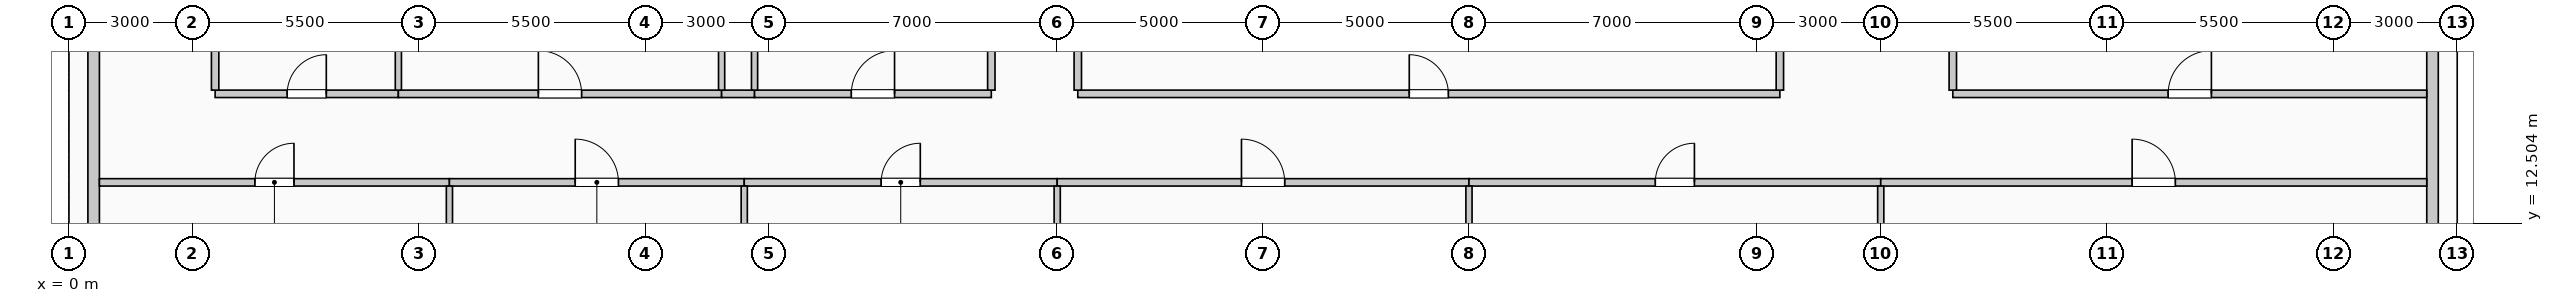
"""IFC4 building model, lengths in metres.
Left out: names, types, materials, properties, quantities, classifications, styles, units other than length and angle.
Written with IfcOpenShell. Run it as: python <this file> out.ifc"""

import sys

from ifc_helpers import new_model, si_unit, direction, frame, frame_2d, origin, place, context, subcontext, project, spatial, rectangle, extrude, element, fill, save


model = new_model("IFC4")
c1 = context("Model", 3, precision=1e-05, world=origin(), true_north=direction((0.0, 1.0)))
c2 = subcontext(c1, "Body", "Model", "MODEL_VIEW")
j1 = project(units=[si_unit("LENGTHUNIT", "METRE"), si_unit("PLANEANGLEUNIT", "RADIAN")], contexts=[c1])
p1 = place(None, origin())
s1 = spatial("IfcSite", under=j1, at=p1, CompositionType="ELEMENT")
p2 = place(p1, origin())
s2 = spatial("IfcBuilding", under=s1, at=p2, CompositionType="ELEMENT")
p3 = place(p2, frame((0.0, 0.0, 140.6)))
s3 = spatial("IfcBuildingStorey", under=s2, at=p3, CompositionType="ELEMENT", Elevation=140.6)
for number, where, z_axis, x_axis in (
    (1, (0.6, 10.445, 0.0), (0.0, 0.0, 1.0), (0.0, 1.0, 0.0)),
    (2, (57.4, 17.555, 0.0), (0.0, 0.0, 1.0), (0.0, -1.0, 0.0)),
):
    element("IfcWall", number, at=place(p3, frame(where, z_axis=z_axis, x_axis=x_axis)), inside=s3, PredefinedType="SOLIDWALL", context=c2, shape_type="SweptSolid", body=[
        extrude(rectangle(XDim=7.11, YDim=0.28, at=frame_2d((3.555, 0.0))), origin(), (0.0, 0.0, 1.0), 2.875),
    ])
p4 = place(p3, frame((0.74, 13.5, 0.0), z_axis=(0.0, 0.0, 1.0), x_axis=(1.0, 0.0, 0.0)))
e3 = element("IfcWall", 3, at=p4, inside=s3, PredefinedType="PARTITIONING", context=c2, shape_type="SweptSolid", body=[
    extrude(rectangle(XDim=8.5, YDim=0.18, at=frame_2d((4.25, 0.0))), origin(), (0.0, 0.0, 1.0), 3.725),
])
p5 = place(p4, frame((3.775, 0.0, 0.0)))
e4 = element("IfcOpeningElement", 4, at=p5, cuts=e3, PredefinedType="OPENING", context=c2, shape_type="SweptSolid", body=[
    extrude(rectangle(XDim=0.95, YDim=2.15, at=frame_2d((0.475, 1.075))), frame((0.0, 0.1, 0.0), z_axis=(0.0, -1.0, 0.0), x_axis=(1.0, 0.0, 0.0)), (0.0, 0.0, 1.0), 0.2),
])
p6 = place(p3, frame((9.24, 13.5, 0.0), z_axis=(0.0, 0.0, 1.0), x_axis=(1.0, 0.0, 0.0)))
e5 = element("IfcWall", 5, at=p6, inside=s3, PredefinedType="PARTITIONING", context=c2, shape_type="SweptSolid", body=[
    extrude(rectangle(XDim=7.16, YDim=0.18, at=frame_2d((3.58, 0.0))), origin(), (0.0, 0.0, 1.0), 3.725),
])
p7 = place(p6, frame((3.055, 0.0, 0.0)))
e6 = element("IfcOpeningElement", 6, at=p7, cuts=e5, PredefinedType="OPENING", context=c2, shape_type="SweptSolid", body=[
    extrude(rectangle(XDim=1.05, YDim=2.15, at=frame_2d((0.525, 1.075))), frame((0.0, 0.1, 0.0), z_axis=(0.0, -1.0, 0.0), x_axis=(1.0, 0.0, 0.0)), (0.0, 0.0, 1.0), 0.2),
])
p8 = place(p3, frame((16.4, 13.5, 0.0), z_axis=(0.0, 0.0, 1.0), x_axis=(1.0, 0.0, 0.0)))
e7 = element("IfcWall", 7, at=p8, inside=s3, PredefinedType="PARTITIONING", context=c2, shape_type="SweptSolid", body=[
    extrude(rectangle(XDim=7.6, YDim=0.18, at=frame_2d((3.8, 0.0))), origin(), (0.0, 0.0, 1.0), 3.725),
])
p9 = place(p8, frame((3.325, 0.0, 0.0)))
e8 = element("IfcOpeningElement", 8, at=p9, cuts=e7, PredefinedType="OPENING", context=c2, shape_type="SweptSolid", body=[
    extrude(rectangle(XDim=0.95, YDim=2.15, at=frame_2d((0.475, 1.075))), frame((0.0, 0.1, 0.0), z_axis=(0.0, -1.0, 0.0), x_axis=(1.0, 0.0, 0.0)), (0.0, 0.0, 1.0), 0.2),
])
p10 = place(p3, frame((24.0, 13.5, 0.0), z_axis=(0.0, 0.0, 1.0), x_axis=(1.0, 0.0, 0.0)))
e9 = element("IfcWall", 9, at=p10, inside=s3, PredefinedType="PARTITIONING", context=c2, shape_type="SweptSolid", body=[
    extrude(rectangle(XDim=10.0, YDim=0.18, at=frame_2d((5.0, 0.0))), origin(), (0.0, 0.0, 1.0), 3.725),
])
p11 = place(p10, frame((4.475, 0.0, 0.0)))
e10 = element("IfcOpeningElement", 10, at=p11, cuts=e9, PredefinedType="OPENING", context=c2, shape_type="SweptSolid", body=[
    extrude(rectangle(XDim=1.05, YDim=2.15, at=frame_2d((0.525, 1.075))), frame((0.0, 0.1, 0.0), z_axis=(0.0, -1.0, 0.0), x_axis=(1.0, 0.0, 0.0)), (0.0, 0.0, 1.0), 0.2),
])
p12 = place(p3, frame((34.0, 13.5, 0.0), z_axis=(0.0, 0.0, 1.0), x_axis=(1.0, 0.0, 0.0)))
e11 = element("IfcWall", 11, at=p12, inside=s3, PredefinedType="PARTITIONING", context=c2, shape_type="SweptSolid", body=[
    extrude(rectangle(XDim=10.0, YDim=0.18, at=frame_2d((5.0, 0.0))), origin(), (0.0, 0.0, 1.0), 3.725),
])
p13 = place(p12, frame((4.525, 0.0, 0.0)))
e12 = element("IfcOpeningElement", 12, at=p13, cuts=e11, PredefinedType="OPENING", context=c2, shape_type="SweptSolid", body=[
    extrude(rectangle(XDim=0.95, YDim=2.15, at=frame_2d((0.475, 1.075))), frame((0.0, 0.1, 0.0), z_axis=(0.0, -1.0, 0.0), x_axis=(1.0, 0.0, 0.0)), (0.0, 0.0, 1.0), 0.2),
])
p14 = place(p3, frame((44.0, 13.5, 0.0), z_axis=(0.0, 0.0, 1.0), x_axis=(1.0, 0.0, 0.0)))
e13 = element("IfcWall", 13, at=p14, inside=s3, PredefinedType="PARTITIONING", context=c2, shape_type="SweptSolid", body=[
    extrude(rectangle(XDim=13.26, YDim=0.18, at=frame_2d((6.63, 0.0))), origin(), (0.0, 0.0, 1.0), 3.725),
])
p15 = place(p14, frame((6.105, 0.0, 0.0)))
e14 = element("IfcOpeningElement", 14, at=p15, cuts=e13, PredefinedType="OPENING", context=c2, shape_type="SweptSolid", body=[
    extrude(rectangle(XDim=1.05, YDim=2.15, at=frame_2d((0.525, 1.075))), frame((0.0, 0.1, 0.0), z_axis=(0.0, -1.0, 0.0), x_axis=(1.0, 0.0, 0.0)), (0.0, 0.0, 1.0), 0.2),
])
p16 = place(p3, frame((3.55, 15.65, 0.0), z_axis=(0.0, 0.0, 1.0), x_axis=(1.0, 0.0, 0.0)))
e15 = element("IfcWall", 15, at=p16, inside=s3, PredefinedType="PARTITIONING", context=c2, shape_type="SweptSolid", body=[
    extrude(rectangle(XDim=4.45, YDim=0.18, at=frame_2d((2.225, 0.0))), origin(), (0.0, 0.0, 1.0), 3.725),
])
p17 = place(p16, frame((1.75, 0.0, 0.0)))
e16 = element("IfcOpeningElement", 16, at=p17, cuts=e15, PredefinedType="OPENING", context=c2, shape_type="SweptSolid", body=[
    extrude(rectangle(XDim=0.95, YDim=2.15, at=frame_2d((0.475, 1.075))), frame((0.0, 0.1, 0.0), z_axis=(0.0, -1.0, 0.0), x_axis=(1.0, 0.0, 0.0)), (0.0, 0.0, 1.0), 0.2),
])
p18 = place(p3, frame((8.0, 15.65, 0.0), z_axis=(0.0, 0.0, 1.0), x_axis=(1.0, 0.0, 0.0)))
e17 = element("IfcWall", 17, at=p18, inside=s3, PredefinedType="PARTITIONING", context=c2, shape_type="SweptSolid", body=[
    extrude(rectangle(XDim=7.85, YDim=0.18, at=frame_2d((3.925, 0.0))), origin(), (0.0, 0.0, 1.0), 3.725),
])
p19 = place(p18, frame((3.4, 0.0, 0.0)))
e18 = element("IfcOpeningElement", 18, at=p19, cuts=e17, PredefinedType="OPENING", context=c2, shape_type="SweptSolid", body=[
    extrude(rectangle(XDim=1.05, YDim=2.15, at=frame_2d((0.525, 1.075))), frame((0.0, 0.1, 0.0), z_axis=(0.0, -1.0, 0.0), x_axis=(1.0, 0.0, 0.0)), (0.0, 0.0, 1.0), 0.2),
])
p20 = place(p3, frame((15.85, 15.65, 0.0), z_axis=(0.0, 0.0, 1.0), x_axis=(1.0, 0.0, 0.0)))
e19 = element("IfcWall", 19, at=p20, inside=s3, PredefinedType="PARTITIONING", context=c2, shape_type="SweptSolid", body=[
    extrude(rectangle(XDim=0.8, YDim=0.18, at=frame_2d((0.4, 0.0))), origin(), (0.0, 0.0, 1.0), 3.725),
])
p21 = place(p3, frame((16.65, 15.65, 0.0), z_axis=(0.0, 0.0, 1.0), x_axis=(1.0, 0.0, 0.0)))
e20 = element("IfcWall", 20, at=p21, inside=s3, PredefinedType="PARTITIONING", context=c2, shape_type="SweptSolid", body=[
    extrude(rectangle(XDim=5.75, YDim=0.18, at=frame_2d((2.875, 0.0))), origin(), (0.0, 0.0, 1.0), 3.725),
])
p22 = place(p21, frame((2.35, 0.0, 0.0)))
e21 = element("IfcOpeningElement", 21, at=p22, cuts=e20, PredefinedType="OPENING", context=c2, shape_type="SweptSolid", body=[
    extrude(rectangle(XDim=1.05, YDim=2.15, at=frame_2d((0.525, 1.075))), frame((0.0, 0.1, 0.0), z_axis=(0.0, -1.0, 0.0), x_axis=(1.0, 0.0, 0.0)), (0.0, 0.0, 1.0), 0.2),
])
p23 = place(p3, frame((24.5, 15.65, 0.0), z_axis=(0.0, 0.0, 1.0), x_axis=(1.0, 0.0, 0.0)))
e22 = element("IfcWall", 22, at=p23, inside=s3, PredefinedType="PARTITIONING", context=c2, shape_type="SweptSolid", body=[
    extrude(rectangle(XDim=17.05, YDim=0.18, at=frame_2d((8.525, 0.0))), origin(), (0.0, 0.0, 1.0), 3.725),
])
p24 = place(p23, frame((8.05, 0.0, 0.0)))
e23 = element("IfcOpeningElement", 23, at=p24, cuts=e22, PredefinedType="OPENING", context=c2, shape_type="SweptSolid", body=[
    extrude(rectangle(XDim=0.95, YDim=2.15, at=frame_2d((0.475, 1.075))), frame((0.0, 0.1, 0.0), z_axis=(0.0, -1.0, 0.0), x_axis=(1.0, 0.0, 0.0)), (0.0, 0.0, 1.0), 0.2),
])
p25 = place(p3, frame((45.75, 15.65, 0.0), z_axis=(0.0, 0.0, 1.0), x_axis=(1.0, 0.0, 0.0)))
e24 = element("IfcWall", 24, at=p25, inside=s3, PredefinedType="PARTITIONING", context=c2, shape_type="SweptSolid", body=[
    extrude(rectangle(XDim=11.51, YDim=0.18, at=frame_2d((5.755, 0.0))), origin(), (0.0, 0.0, 1.0), 3.725),
])
p26 = place(p25, frame((5.23, 0.0, 0.0)))
e25 = element("IfcOpeningElement", 25, at=p26, cuts=e24, PredefinedType="OPENING", context=c2, shape_type="SweptSolid", body=[
    extrude(rectangle(XDim=1.05, YDim=2.15, at=frame_2d((0.525, 1.075))), frame((0.0, 0.1, 0.0), z_axis=(0.0, -1.0, 0.0), x_axis=(1.0, 0.0, 0.0)), (0.0, 0.0, 1.0), 0.2),
])
p27 = place(p3, frame((3.55, 15.74, 0.0), z_axis=(0.0, 0.0, 1.0), x_axis=(0.0, 1.0, 0.0)))
e26 = element("IfcWall", 26, at=p27, inside=s3, PredefinedType="PARTITIONING", context=c2, shape_type="SweptSolid", body=[
    extrude(rectangle(XDim=3.135, YDim=0.18, at=frame_2d((1.567, 0.0))), origin(), (0.0, 0.0, 1.0), 3.725),
])
p28 = place(p3, frame((8.0, 15.74, 0.0), z_axis=(0.0, 0.0, 1.0), x_axis=(0.0, 1.0, 0.0)))
e27 = element("IfcWall", 27, at=p28, inside=s3, PredefinedType="PARTITIONING", context=c2, shape_type="SweptSolid", body=[
    extrude(rectangle(XDim=3.135, YDim=0.15, at=frame_2d((1.567, 0.0))), origin(), (0.0, 0.0, 1.0), 3.725),
])
p29 = place(p3, frame((9.24, 0.74, 0.0), z_axis=(0.0, 0.0, 1.0), x_axis=(0.0, 1.0, 0.0)))
e28 = element("IfcWall", 28, at=p29, inside=s3, PredefinedType="PARTITIONING", context=c2, shape_type="SweptSolid", body=[
    extrude(rectangle(XDim=12.67, YDim=0.15, at=frame_2d((6.335, 0.0))), origin(), (0.0, 0.0, 1.0), 3.725),
])
p30 = place(p3, frame((15.85, 15.74, 0.0), z_axis=(0.0, 0.0, 1.0), x_axis=(0.0, 1.0, 0.0)))
e29 = element("IfcWall", 29, at=p30, inside=s3, PredefinedType="PARTITIONING", context=c2, shape_type="SweptSolid", body=[
    extrude(rectangle(XDim=1.76, YDim=0.15, at=frame_2d((0.88, 0.0))), origin(), (0.0, 0.0, 1.0), 3.725),
])
p31 = place(p3, frame((16.4, 1.3, 0.0), z_axis=(0.0, 0.0, 1.0), x_axis=(0.0, 1.0, 0.0)))
e30 = element("IfcWall", 30, at=p31, inside=s3, PredefinedType="PARTITIONING", context=c2, shape_type="SweptSolid", body=[
    extrude(rectangle(XDim=12.11, YDim=0.15, at=frame_2d((6.055, 0.0))), origin(), (0.0, 0.0, 1.0), 3.07),
])
p32 = place(p3, frame((16.65, 15.74, 0.0), z_axis=(0.0, 0.0, 1.0), x_axis=(0.0, 1.0, 0.0)))
e31 = element("IfcWall", 31, at=p32, inside=s3, PredefinedType="PARTITIONING", context=c2, shape_type="SweptSolid", body=[
    extrude(rectangle(XDim=1.76, YDim=0.15, at=frame_2d((0.88, 0.0))), origin(), (0.0, 0.0, 1.0), 3.07),
])
p33 = place(p3, frame((22.4, 15.74, 0.0), z_axis=(0.0, 0.0, 1.0), x_axis=(0.0, 1.0, 0.0)))
e32 = element("IfcWall", 32, at=p33, inside=s3, PredefinedType="PARTITIONING", context=c2, shape_type="SweptSolid", body=[
    extrude(rectangle(XDim=13.985, YDim=0.18, at=frame_2d((6.993, 0.0))), origin(), (0.0, 0.0, 1.0), 3.725),
])
p34 = place(p3, frame((24.0, 1.3, 0.0), z_axis=(0.0, 0.0, 1.0), x_axis=(0.0, 1.0, 0.0)))
e33 = element("IfcWall", 33, at=p34, inside=s3, PredefinedType="PARTITIONING", context=c2, shape_type="SweptSolid", body=[
    extrude(rectangle(XDim=12.11, YDim=0.15, at=frame_2d((6.055, 0.0))), origin(), (0.0, 0.0, 1.0), 3.725),
])
p35 = place(p3, frame((24.5, 15.74, 0.0), z_axis=(0.0, 0.0, 1.0), x_axis=(0.0, 1.0, 0.0)))
e34 = element("IfcWall", 34, at=p35, inside=s3, PredefinedType="PARTITIONING", context=c2, shape_type="SweptSolid", body=[
    extrude(rectangle(XDim=15.97, YDim=0.18, at=frame_2d((7.985, 0.0))), origin(), (0.0, 0.0, 1.0), 3.725),
])
p36 = place(p3, frame((34.0, 1.3, 0.0), z_axis=(0.0, 0.0, 1.0), x_axis=(0.0, 1.0, 0.0)))
e35 = element("IfcWall", 35, at=p36, inside=s3, PredefinedType="PARTITIONING", context=c2, shape_type="SweptSolid", body=[
    extrude(rectangle(XDim=12.11, YDim=0.15, at=frame_2d((6.055, 0.0))), origin(), (0.0, 0.0, 1.0), 3.725),
])
p37 = place(p3, frame((41.55, 15.74, 0.0), z_axis=(0.0, 0.0, 1.0), x_axis=(0.0, 1.0, 0.0)))
e36 = element("IfcWall", 36, at=p37, inside=s3, PredefinedType="PARTITIONING", context=c2, shape_type="SweptSolid", body=[
    extrude(rectangle(XDim=1.76, YDim=0.18, at=frame_2d((0.88, 0.0))), origin(), (0.0, 0.0, 1.0), 3.07),
])
p38 = place(p3, frame((44.0, 1.175, 0.0), z_axis=(0.0, 0.0, 1.0), x_axis=(0.0, 1.0, 0.0)))
e37 = element("IfcWall", 37, at=p38, inside=s3, PredefinedType="PARTITIONING", context=c2, shape_type="SweptSolid", body=[
    extrude(rectangle(XDim=12.235, YDim=0.15, at=frame_2d((6.117, 0.0))), origin(), (0.0, 0.0, 1.0), 3.725),
])
p39 = place(p3, frame((45.75, 15.74, 0.0), z_axis=(0.0, 0.0, 1.0), x_axis=(0.0, 1.0, 0.0)))
e38 = element("IfcWall", 38, at=p39, inside=s3, PredefinedType="PARTITIONING", context=c2, shape_type="SweptSolid", body=[
    extrude(rectangle(XDim=16.535, YDim=0.18, at=frame_2d((8.268, 0.0))), origin(), (0.0, 0.0, 1.0), 3.725),
])
p40 = place(p5, origin())
e39 = element("IfcDoor", 39, at=p40, inside=s3, OperationType="SINGLE_SWING_RIGHT", PredefinedType="DOOR", context=c2, shape_type="SweptSolid", body=[
    extrude(rectangle(XDim=0.95, YDim=2.15, at=frame_2d((0.475, 1.075))), frame((0.0, 0.025, 0.0), z_axis=(0.0, -1.0, 0.0), x_axis=(1.0, 0.0, 0.0)), (0.0, 0.0, 1.0), 0.05),
])
fill(e4, e39)
p41 = place(p7, origin())
e40 = element("IfcDoor", 40, at=p41, inside=s3, OperationType="SINGLE_SWING_LEFT", PredefinedType="DOOR", context=c2, shape_type="SweptSolid", body=[
    extrude(rectangle(XDim=1.05, YDim=2.15, at=frame_2d((0.525, 1.075))), frame((0.0, 0.025, 0.0), z_axis=(0.0, -1.0, 0.0), x_axis=(1.0, 0.0, 0.0)), (0.0, 0.0, 1.0), 0.05),
])
fill(e6, e40)
p42 = place(p9, origin())
e41 = element("IfcDoor", 41, at=p42, inside=s3, OperationType="SINGLE_SWING_RIGHT", PredefinedType="DOOR", context=c2, shape_type="SweptSolid", body=[
    extrude(rectangle(XDim=0.95, YDim=2.15, at=frame_2d((0.475, 1.075))), frame((0.0, 0.025, 0.0), z_axis=(0.0, -1.0, 0.0), x_axis=(1.0, 0.0, 0.0)), (0.0, 0.0, 1.0), 0.05),
])
fill(e8, e41)
p43 = place(p11, origin())
e42 = element("IfcDoor", 42, at=p43, inside=s3, OperationType="SINGLE_SWING_LEFT", PredefinedType="DOOR", context=c2, shape_type="SweptSolid", body=[
    extrude(rectangle(XDim=1.05, YDim=2.15, at=frame_2d((0.525, 1.075))), frame((0.0, 0.025, 0.0), z_axis=(0.0, -1.0, 0.0), x_axis=(1.0, 0.0, 0.0)), (0.0, 0.0, 1.0), 0.05),
])
fill(e10, e42)
p44 = place(p13, origin())
e43 = element("IfcDoor", 43, at=p44, inside=s3, OperationType="SINGLE_SWING_RIGHT", PredefinedType="DOOR", context=c2, shape_type="SweptSolid", body=[
    extrude(rectangle(XDim=0.95, YDim=2.15, at=frame_2d((0.475, 1.075))), frame((0.0, 0.025, 0.0), z_axis=(0.0, -1.0, 0.0), x_axis=(1.0, 0.0, 0.0)), (0.0, 0.0, 1.0), 0.05),
])
fill(e12, e43)
p45 = place(p15, origin())
e44 = element("IfcDoor", 44, at=p45, inside=s3, OperationType="SINGLE_SWING_LEFT", PredefinedType="DOOR", context=c2, shape_type="SweptSolid", body=[
    extrude(rectangle(XDim=1.05, YDim=2.15, at=frame_2d((0.525, 1.075))), frame((0.0, 0.025, 0.0), z_axis=(0.0, -1.0, 0.0), x_axis=(1.0, 0.0, 0.0)), (0.0, 0.0, 1.0), 0.05),
])
fill(e14, e44)
p46 = place(p17, origin())
e45 = element("IfcDoor", 45, at=p46, inside=s3, OperationType="SINGLE_SWING_RIGHT", PredefinedType="DOOR", context=c2, shape_type="SweptSolid", body=[
    extrude(rectangle(XDim=0.95, YDim=2.15, at=frame_2d((0.475, 1.075))), frame((0.0, 0.025, 0.0), z_axis=(0.0, -1.0, 0.0), x_axis=(1.0, 0.0, 0.0)), (0.0, 0.0, 1.0), 0.05),
])
fill(e16, e45)
p47 = place(p19, origin())
e46 = element("IfcDoor", 46, at=p47, inside=s3, OperationType="SINGLE_SWING_LEFT", PredefinedType="DOOR", context=c2, shape_type="SweptSolid", body=[
    extrude(rectangle(XDim=1.05, YDim=2.15, at=frame_2d((0.525, 1.075))), frame((0.0, 0.025, 0.0), z_axis=(0.0, -1.0, 0.0), x_axis=(1.0, 0.0, 0.0)), (0.0, 0.0, 1.0), 0.05),
])
fill(e18, e46)
p48 = place(p22, origin())
e47 = element("IfcDoor", 47, at=p48, inside=s3, OperationType="SINGLE_SWING_RIGHT", PredefinedType="DOOR", context=c2, shape_type="SweptSolid", body=[
    extrude(rectangle(XDim=1.05, YDim=2.15, at=frame_2d((0.525, 1.075))), frame((0.0, 0.025, 0.0), z_axis=(0.0, -1.0, 0.0), x_axis=(1.0, 0.0, 0.0)), (0.0, 0.0, 1.0), 0.05),
])
fill(e21, e47)
p49 = place(p24, origin())
e48 = element("IfcDoor", 48, at=p49, inside=s3, OperationType="SINGLE_SWING_LEFT", PredefinedType="DOOR", context=c2, shape_type="SweptSolid", body=[
    extrude(rectangle(XDim=0.95, YDim=2.15, at=frame_2d((0.475, 1.075))), frame((0.0, 0.025, 0.0), z_axis=(0.0, -1.0, 0.0), x_axis=(1.0, 0.0, 0.0)), (0.0, 0.0, 1.0), 0.05),
])
fill(e23, e48)
p50 = place(p26, origin())
e49 = element("IfcDoor", 49, at=p50, inside=s3, OperationType="SINGLE_SWING_RIGHT", PredefinedType="DOOR", context=c2, shape_type="SweptSolid", body=[
    extrude(rectangle(XDim=1.05, YDim=2.15, at=frame_2d((0.525, 1.075))), frame((0.0, 0.025, 0.0), z_axis=(0.0, -1.0, 0.0), x_axis=(1.0, 0.0, 0.0)), (0.0, 0.0, 1.0), 0.05),
])
fill(e25, e49)
save(model, sys.argv[1])
